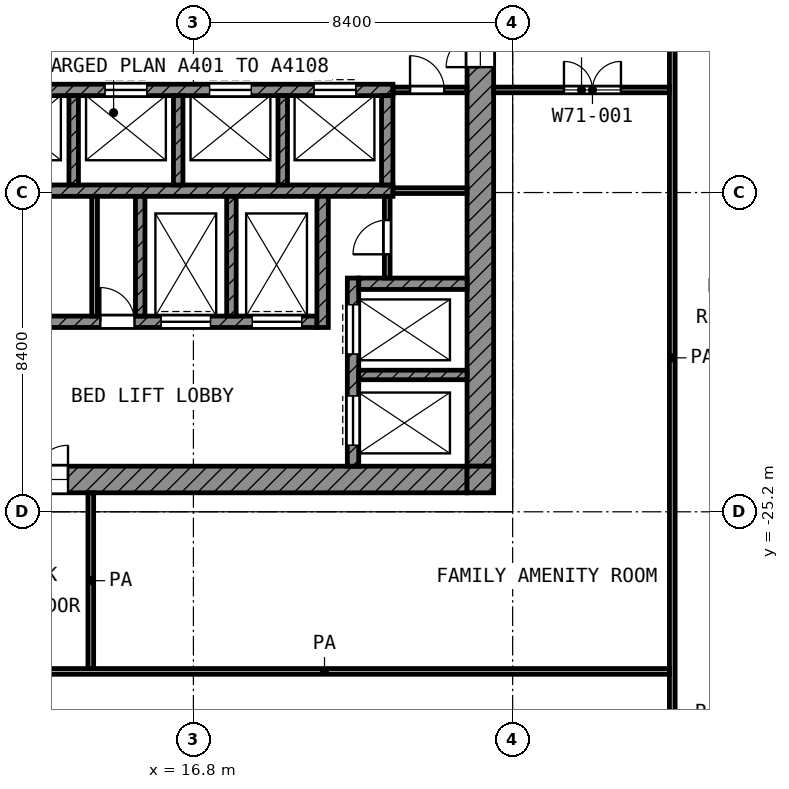
"""IFC4 building model, lengths in metres.
Left out: names, types, materials, properties, quantities, classifications, styles, units other than length and angle.
Written with IfcOpenShell. Run it as: python <this file> out.ifc"""

import sys

from ifc_helpers import new_model, si_unit, direction, frame, frame_2d, origin, place, context, subcontext, project, spatial, rectangle, extrude, element, fill, save


model = new_model("IFC4")
c1 = context("Model", 3, precision=1e-05, world=origin(), true_north=direction((0.0, 1.0)))
c2 = subcontext(c1, "Body", "Model", "MODEL_VIEW")
j1 = project(units=[si_unit("LENGTHUNIT", "METRE"), si_unit("PLANEANGLEUNIT", "RADIAN")], contexts=[c1])
p1 = place(None, origin())
s1 = spatial("IfcSite", under=j1, at=p1, CompositionType="ELEMENT")
p2 = place(p1, origin())
s2 = spatial("IfcBuilding", under=s1, at=p2, CompositionType="ELEMENT")
p3 = place(p2, frame((0.0, 0.0, 328.0)))
s3 = spatial("IfcBuildingStorey", under=s2, at=p3, CompositionType="ELEMENT", Elevation=328.0)
p4 = place(p3, frame((24.35, -24.0, 0.0), z_axis=(0.0, 0.0, 1.0), x_axis=(0.0, 1.0, 0.0)))
e1 = element("IfcWall", 1, at=p4, inside=s3, PredefinedType="SHEAR", context=c2, shape_type="SweptSolid", body=[
    extrude(rectangle(XDim=18.6, YDim=0.7, at=frame_2d((9.3, 0.0))), origin(), (0.0, 0.0, 1.0), 3.78),
])
p5 = place(p4, frame((10.5, 0.0, 0.0)))
e2 = element("IfcOpeningElement", 2, at=p5, cuts=e1, PredefinedType="OPENING", context=c2, shape_type="SweptSolid", body=[
    extrude(rectangle(XDim=1.8, YDim=2.1, at=frame_2d((0.9, 1.05))), frame((0.0, 0.36, 0.0), z_axis=(0.0, -1.0, 0.0), x_axis=(1.0, 0.0, 0.0)), (0.0, 0.0, 1.0), 0.72),
])
p6 = place(p3, frame((5.4, -24.35, 0.0), z_axis=(0.0, 0.0, 1.0), x_axis=(1.0, 0.0, 0.0)))
e3 = element("IfcWall", 3, at=p6, inside=s3, PredefinedType="SHEAR", context=c2, shape_type="SweptSolid", body=[
    extrude(rectangle(XDim=18.6, YDim=0.7, at=frame_2d((9.3, 0.0))), origin(), (0.0, 0.0, 1.0), 3.78),
])
p7 = place(p6, frame((6.3, 0.0, 0.0)))
e4 = element("IfcOpeningElement", 4, at=p7, cuts=e3, PredefinedType="OPENING", context=c2, shape_type="SweptSolid", body=[
    extrude(rectangle(XDim=1.8, YDim=2.1, at=frame_2d((0.9, 1.05))), frame((0.0, 0.36, 0.0), z_axis=(0.0, -1.0, 0.0), x_axis=(1.0, 0.0, 0.0)), (0.0, 0.0, 1.0), 0.72),
])
p8 = place(p3, frame((24.35, -24.7, 0.0), z_axis=(0.0, 0.0, 1.0), x_axis=(0.0, 1.0, 0.0)))
e5 = element("IfcWall", 5, at=p8, inside=s3, PredefinedType="SHEAR", context=c2, shape_type="SweptSolid", body=[
    extrude(rectangle(XDim=0.7, YDim=0.7, at=frame_2d((0.35, 0.0))), origin(), (0.0, 0.0, 1.0), 3.78),
])
p9 = place(p3, frame((5.4, -14.1, 0.0), z_axis=(0.0, 0.0, 1.0), x_axis=(1.0, 0.0, 0.0)))
e6 = element("IfcWall", 6, at=p9, inside=s3, PredefinedType="SHEAR", context=c2, shape_type="SweptSolid", body=[
    extrude(rectangle(XDim=16.65, YDim=0.3, at=frame_2d((8.325, 0.0))), origin(), (0.0, 0.0, 1.0), 3.78),
])
p10 = place(p9, frame((6.325, 0.0, 0.0)))
e7 = element("IfcOpeningElement", 7, at=p10, cuts=e6, PredefinedType="OPENING", context=c2, shape_type="SweptSolid", body=[
    extrude(rectangle(XDim=1.1, YDim=2.1, at=frame_2d((0.55, 1.05))), frame((0.0, 0.16, 0.0), z_axis=(0.0, -1.0, 0.0), x_axis=(1.0, 0.0, 0.0)), (0.0, 0.0, 1.0), 0.32),
])
p11 = place(p9, frame((9.075, 0.0, 0.0)))
e8 = element("IfcOpeningElement", 8, at=p11, cuts=e6, PredefinedType="OPENING", context=c2, shape_type="SweptSolid", body=[
    extrude(rectangle(XDim=1.1, YDim=2.1, at=frame_2d((0.55, 1.05))), frame((0.0, 0.16, 0.0), z_axis=(0.0, -1.0, 0.0), x_axis=(1.0, 0.0, 0.0)), (0.0, 0.0, 1.0), 0.32),
])
p12 = place(p9, frame((11.825, 0.0, 0.0)))
e9 = element("IfcOpeningElement", 9, at=p12, cuts=e6, PredefinedType="OPENING", context=c2, shape_type="SweptSolid", body=[
    extrude(rectangle(XDim=1.1, YDim=2.1, at=frame_2d((0.55, 1.05))), frame((0.0, 0.16, 0.0), z_axis=(0.0, -1.0, 0.0), x_axis=(1.0, 0.0, 0.0)), (0.0, 0.0, 1.0), 0.32),
])
p13 = place(p9, frame((14.575, 0.0, 0.0)))
e10 = element("IfcOpeningElement", 10, at=p13, cuts=e6, PredefinedType="OPENING", context=c2, shape_type="SweptSolid", body=[
    extrude(rectangle(XDim=1.1, YDim=2.1, at=frame_2d((0.55, 1.05))), frame((0.0, 0.16, 0.0), z_axis=(0.0, -1.0, 0.0), x_axis=(1.0, 0.0, 0.0)), (0.0, 0.0, 1.0), 0.32),
])
p14 = place(p9, frame((2.3, 0.0, 0.0)))
e11 = element("IfcOpeningElement", 11, at=p14, cuts=e6, PredefinedType="OPENING", context=c2, shape_type="SweptSolid", body=[
    extrude(rectangle(XDim=0.9, YDim=2.1, at=frame_2d((0.45, 1.05))), frame((0.0, 0.16, 0.0), z_axis=(0.0, -1.0, 0.0), x_axis=(1.0, 0.0, 0.0)), (0.0, 0.0, 1.0), 0.32),
])
p15 = place(p3, frame((5.4, -16.75, 0.0), z_axis=(0.0, 0.0, 1.0), x_axis=(1.0, 0.0, 0.0)))
e12 = element("IfcWall", 12, at=p15, inside=s3, PredefinedType="SHEAR", context=c2, shape_type="SweptSolid", body=[
    extrude(rectangle(XDim=16.65, YDim=0.3, at=frame_2d((8.325, 0.0))), origin(), (0.0, 0.0, 1.0), 3.78),
])
p16 = place(p3, frame((5.4, -20.2, 0.0), z_axis=(0.0, 0.0, 1.0), x_axis=(1.0, 0.0, 0.0)))
e13 = element("IfcWall", 13, at=p16, inside=s3, PredefinedType="SHEAR", context=c2, shape_type="SweptSolid", body=[
    extrude(rectangle(XDim=14.65, YDim=0.3, at=frame_2d((7.325, 0.0))), origin(), (0.0, 0.0, 1.0), 3.78),
])
p17 = place(p16, frame((10.55, 0.0, 0.0)))
e14 = element("IfcOpeningElement", 14, at=p17, cuts=e13, PredefinedType="OPENING", context=c2, shape_type="SweptSolid", body=[
    extrude(rectangle(XDim=1.3, YDim=2.1, at=frame_2d((0.65, 1.05))), frame((0.0, 0.16, 0.0), z_axis=(0.0, -1.0, 0.0), x_axis=(1.0, 0.0, 0.0)), (0.0, 0.0, 1.0), 0.32),
])
p18 = place(p16, frame((12.95, 0.0, 0.0)))
e15 = element("IfcOpeningElement", 15, at=p18, cuts=e13, PredefinedType="OPENING", context=c2, shape_type="SweptSolid", body=[
    extrude(rectangle(XDim=1.3, YDim=2.1, at=frame_2d((0.65, 1.05))), frame((0.0, 0.16, 0.0), z_axis=(0.0, -1.0, 0.0), x_axis=(1.0, 0.0, 0.0)), (0.0, 0.0, 1.0), 0.32),
])
p19 = place(p16, frame((0.55, 0.0, 0.0)))
e16 = element("IfcOpeningElement", 16, at=p19, cuts=e13, PredefinedType="OPENING", context=c2, shape_type="SweptSolid", body=[
    extrude(rectangle(XDim=1.3, YDim=2.1, at=frame_2d((0.65, 1.05))), frame((0.0, 0.16, 0.0), z_axis=(0.0, -1.0, 0.0), x_axis=(1.0, 0.0, 0.0)), (0.0, 0.0, 1.0), 0.32),
])
p20 = place(p16, frame((2.95, 0.0, 0.0)))
e17 = element("IfcOpeningElement", 17, at=p20, cuts=e13, PredefinedType="OPENING", context=c2, shape_type="SweptSolid", body=[
    extrude(rectangle(XDim=1.3, YDim=2.1, at=frame_2d((0.65, 1.05))), frame((0.0, 0.16, 0.0), z_axis=(0.0, -1.0, 0.0), x_axis=(1.0, 0.0, 0.0)), (0.0, 0.0, 1.0), 0.32),
])
p21 = place(p16, frame((6.55, 0.0, 0.0)))
e18 = element("IfcOpeningElement", 18, at=p21, cuts=e13, PredefinedType="OPENING", context=c2, shape_type="SweptSolid", body=[
    extrude(rectangle(XDim=0.9, YDim=2.1, at=frame_2d((0.45, 1.05))), frame((0.0, 0.16, 0.0), z_axis=(0.0, -1.0, 0.0), x_axis=(1.0, 0.0, 0.0)), (0.0, 0.0, 1.0), 0.32),
])
p22 = place(p16, frame((8.95, 0.0, 0.0)))
e19 = element("IfcOpeningElement", 19, at=p22, cuts=e13, PredefinedType="OPENING", context=c2, shape_type="SweptSolid", body=[
    extrude(rectangle(XDim=0.9, YDim=2.1, at=frame_2d((0.45, 1.05))), frame((0.0, 0.16, 0.0), z_axis=(0.0, -1.0, 0.0), x_axis=(1.0, 0.0, 0.0)), (0.0, 0.0, 1.0), 0.32),
])
p23 = place(p3, frame((20.2, -20.35, 0.0), z_axis=(0.0, 0.0, 1.0), x_axis=(0.0, 1.0, 0.0)))
e20 = element("IfcWall", 20, at=p23, inside=s3, PredefinedType="SHEAR", context=c2, shape_type="SweptSolid", body=[
    extrude(rectangle(XDim=3.45, YDim=0.3, at=frame_2d((1.725, 0.0))), origin(), (0.0, 0.0, 1.0), 3.78),
])
p24 = place(p3, frame((21.9, -16.6, 0.0), z_axis=(0.0, 0.0, 1.0), x_axis=(0.0, 1.0, 0.0)))
e21 = element("IfcWall", 21, at=p24, inside=s3, PredefinedType="SHEAR", context=c2, shape_type="SweptSolid", body=[
    extrude(rectangle(XDim=2.35, YDim=0.3, at=frame_2d((1.175, 0.0))), origin(), (0.0, 0.0, 1.0), 3.78),
])
p25 = place(p3, frame((21.15, -19.2, 0.0), z_axis=(0.0, 0.0, 1.0), x_axis=(1.0, 0.0, 0.0)))
e22 = element("IfcWall", 22, at=p25, inside=s3, PredefinedType="SHEAR", context=c2, shape_type="SweptSolid", body=[
    extrude(rectangle(XDim=2.85, YDim=0.3, at=frame_2d((1.425, 0.0))), origin(), (0.0, 0.0, 1.0), 3.78),
])
p26 = place(p3, frame((21.0, -24.0, 0.0), z_axis=(0.0, 0.0, 1.0), x_axis=(0.0, 1.0, 0.0)))
e23 = element("IfcWall", 23, at=p26, inside=s3, PredefinedType="SHEAR", context=c2, shape_type="SweptSolid", body=[
    extrude(rectangle(XDim=4.95, YDim=0.3, at=frame_2d((2.475, 0.0))), origin(), (0.0, 0.0, 1.0), 3.78),
])
p27 = place(p26, frame((2.95, 0.0, 0.0)))
e24 = element("IfcOpeningElement", 24, at=p27, cuts=e23, PredefinedType="OPENING", context=c2, shape_type="SweptSolid", body=[
    extrude(rectangle(XDim=1.3, YDim=2.1, at=frame_2d((0.65, 1.05))), frame((0.0, 0.16, 0.0), z_axis=(0.0, -1.0, 0.0), x_axis=(1.0, 0.0, 0.0)), (0.0, 0.0, 1.0), 0.32),
])
p28 = place(p26, frame((0.55, 0.0, 0.0)))
e25 = element("IfcOpeningElement", 25, at=p28, cuts=e23, PredefinedType="OPENING", context=c2, shape_type="SweptSolid", body=[
    extrude(rectangle(XDim=1.3, YDim=2.1, at=frame_2d((0.65, 1.05))), frame((0.0, 0.16, 0.0), z_axis=(0.0, -1.0, 0.0), x_axis=(1.0, 0.0, 0.0)), (0.0, 0.0, 1.0), 0.32),
])
p29 = place(p3, frame((21.15, -21.6, 0.0), z_axis=(0.0, 0.0, 1.0), x_axis=(1.0, 0.0, 0.0)))
e26 = element("IfcWall", 26, at=p29, inside=s3, PredefinedType="SHEAR", context=c2, shape_type="SweptSolid", body=[
    extrude(rectangle(XDim=2.85, YDim=0.25, at=frame_2d((1.425, 0.0))), origin(), (0.0, 0.0, 1.0), 3.78),
])
for number, where, z_axis, x_axis in (
    (27, (15.4, -20.05, 0.0), (0.0, 0.0, 1.0), (0.0, 1.0, 0.0)),
    (28, (17.8, -20.05, 0.0), (0.0, 0.0, 1.0), (0.0, 1.0, 0.0)),
):
    element("IfcWall", number, at=place(p3, frame(where, z_axis=z_axis, x_axis=x_axis)), inside=s3, PredefinedType="SHEAR", context=c2, shape_type="SweptSolid", body=[
        extrude(rectangle(XDim=3.15, YDim=0.25, at=frame_2d((1.575, 0.0))), origin(), (0.0, 0.0, 1.0), 3.78),
    ])
for number, where, z_axis, x_axis in (
    (29, (13.65, -16.6, 0.0), (0.0, 0.0, 1.0), (0.0, 1.0, 0.0)),
    (30, (16.4, -16.6, 0.0), (0.0, 0.0, 1.0), (0.0, 1.0, 0.0)),
    (31, (19.15, -16.6, 0.0), (0.0, 0.0, 1.0), (0.0, 1.0, 0.0)),
):
    element("IfcWall", number, at=place(p3, frame(where, z_axis=z_axis, x_axis=x_axis)), inside=s3, PredefinedType="SHEAR", context=c2, shape_type="SweptSolid", body=[
        extrude(rectangle(XDim=2.35, YDim=0.25, at=frame_2d((1.175, 0.0))), origin(), (0.0, 0.0, 1.0), 3.78),
    ])
p30 = place(p3, frame((21.9, -19.05, 0.0), z_axis=(0.0, 0.0, 1.0), x_axis=(0.0, 1.0, 0.0)))
e32 = element("IfcWall", 32, at=p30, inside=s3, PredefinedType="PARTITIONING", context=c2, shape_type="SweptSolid", body=[
    extrude(rectangle(XDim=2.15, YDim=0.15, at=frame_2d((1.075, 0.0))), origin(), (0.0, 0.0, 1.0), 3.78),
])
p31 = place(p30, frame((0.625, 0.0, 0.0)))
e33 = element("IfcOpeningElement", 33, at=p31, cuts=e32, PredefinedType="OPENING", context=c2, shape_type="SweptSolid", body=[
    extrude(rectangle(XDim=0.9, YDim=2.1, at=frame_2d((0.45, 1.05))), frame((0.0, 0.085, 0.0), z_axis=(0.0, -1.0, 0.0), x_axis=(1.0, 0.0, 0.0)), (0.0, 0.0, 1.0), 0.17),
])
p32 = place(p3, frame((22.05, -16.75, 0.0), z_axis=(0.0, 0.0, 1.0), x_axis=(1.0, 0.0, 0.0)))
e34 = element("IfcWall", 34, at=p32, inside=s3, PredefinedType="PARTITIONING", context=c2, shape_type="SweptSolid", body=[
    extrude(rectangle(XDim=1.95, YDim=0.15, at=frame_2d((0.975, 0.0))), origin(), (0.0, 0.0, 1.0), 3.78),
])
p33 = place(p3, frame((22.05, -14.1, 0.0), z_axis=(0.0, 0.0, 1.0), x_axis=(1.0, 0.0, 0.0)))
e35 = element("IfcWall", 35, at=p33, inside=s3, PredefinedType="PARTITIONING", context=c2, shape_type="SweptSolid", body=[
    extrude(rectangle(XDim=1.95, YDim=0.15, at=frame_2d((0.975, 0.0))), origin(), (0.0, 0.0, 1.0), 3.78),
])
p34 = place(p33, frame((0.45, 0.0, 0.0)))
e36 = element("IfcOpeningElement", 36, at=p34, cuts=e35, PredefinedType="OPENING", context=c2, shape_type="SweptSolid", body=[
    extrude(rectangle(XDim=0.9, YDim=2.1, at=frame_2d((0.45, 1.05))), frame((0.0, 0.085, 0.0), z_axis=(0.0, -1.0, 0.0), x_axis=(1.0, 0.0, 0.0)), (0.0, 0.0, 1.0), 0.17),
])
p35 = place(p3, frame((14.2, -20.05, 0.0), z_axis=(0.0, 0.0, 1.0), x_axis=(0.0, 1.0, 0.0)))
e37 = element("IfcWall", 37, at=p35, inside=s3, PredefinedType="PARTITIONING", context=c2, shape_type="SweptSolid", body=[
    extrude(rectangle(XDim=3.15, YDim=0.15, at=frame_2d((1.575, 0.0))), origin(), (0.0, 0.0, 1.0), 3.78),
])
p36 = place(p3, frame((11.175, -29.4, 0.0), z_axis=(0.0, 0.0, 1.0), x_axis=(1.0, 0.0, 0.0)))
e38 = element("IfcWall", 38, at=p36, inside=s3, PredefinedType="PARTITIONING", context=c2, shape_type="SweptSolid", body=[
    extrude(rectangle(XDim=18.15, YDim=0.15, at=frame_2d((9.075, 0.0))), origin(), (0.0, 0.0, 1.0), 3.78),
])
p37 = place(p3, frame((24.7, -14.1, 0.0), z_axis=(0.0, 0.0, 1.0), x_axis=(1.0, 0.0, 0.0)))
e39 = element("IfcWall", 39, at=p37, inside=s3, PredefinedType="PARTITIONING", context=c2, shape_type="SweptSolid", body=[
    extrude(rectangle(XDim=4.625, YDim=0.15, at=frame_2d((2.312, 0.0))), origin(), (0.0, 0.0, 1.0), 3.78),
])
p38 = place(p37, frame((1.85, 0.0, 0.0)))
e40 = element("IfcOpeningElement", 40, at=p38, cuts=e39, PredefinedType="OPENING", context=c2, shape_type="SweptSolid", body=[
    extrude(rectangle(XDim=1.5, YDim=2.1, at=frame_2d((0.75, 1.05))), frame((0.0, 0.085, 0.0), z_axis=(0.0, -1.0, 0.0), x_axis=(1.0, 0.0, 0.0)), (0.0, 0.0, 1.0), 0.17),
])
p39 = place(p3, frame((14.1, -29.325, 0.0), z_axis=(0.0, 0.0, 1.0), x_axis=(0.0, 1.0, 0.0)))
e41 = element("IfcWall", 41, at=p39, inside=s3, PredefinedType="PARTITIONING", context=c2, shape_type="SweptSolid", body=[
    extrude(rectangle(XDim=4.625, YDim=0.15, at=frame_2d((2.312, 0.0))), origin(), (0.0, 0.0, 1.0), 3.78),
])
p40 = place(p3, frame((29.4, -31.198, 0.0), z_axis=(0.0, 0.0, 1.0), x_axis=(0.0, 1.0, 0.0)))
e42 = element("IfcWall", 42, at=p40, inside=s3, PredefinedType="PARTITIONING", context=c2, shape_type="SweptSolid", body=[
    extrude(rectangle(XDim=20.098, YDim=0.15, at=frame_2d((10.049, 0.0))), origin(), (0.0, 0.0, 1.0), 3.78),
])
p41 = place(p11, origin())
e43 = element("IfcDoor", 43, at=p41, inside=s3, OperationType="DOUBLE_DOOR_SLIDING", PredefinedType="DOOR", context=c2, shape_type="SweptSolid", body=[
    extrude(rectangle(XDim=1.1, YDim=2.1, at=frame_2d((0.55, 1.05))), frame((0.0, 0.025, 0.0), z_axis=(0.0, -1.0, 0.0), x_axis=(1.0, 0.0, 0.0)), (0.0, 0.0, 1.0), 0.05),
])
fill(e8, e43)
p42 = place(p12, origin())
e44 = element("IfcDoor", 44, at=p42, inside=s3, OperationType="DOUBLE_DOOR_SLIDING", PredefinedType="DOOR", context=c2, shape_type="SweptSolid", body=[
    extrude(rectangle(XDim=1.1, YDim=2.1, at=frame_2d((0.55, 1.05))), frame((0.0, 0.025, 0.0), z_axis=(0.0, -1.0, 0.0), x_axis=(1.0, 0.0, 0.0)), (0.0, 0.0, 1.0), 0.05),
])
fill(e9, e44)
p43 = place(p13, origin())
e45 = element("IfcDoor", 45, at=p43, inside=s3, OperationType="DOUBLE_DOOR_SLIDING", PredefinedType="DOOR", context=c2, shape_type="SweptSolid", body=[
    extrude(rectangle(XDim=1.1, YDim=2.1, at=frame_2d((0.55, 1.05))), frame((0.0, 0.025, 0.0), z_axis=(0.0, -1.0, 0.0), x_axis=(1.0, 0.0, 0.0)), (0.0, 0.0, 1.0), 0.05),
])
fill(e10, e45)
p44 = place(p27, origin())
e46 = element("IfcDoor", 46, at=p44, inside=s3, OperationType="DOUBLE_DOOR_SLIDING", PredefinedType="DOOR", context=c2, shape_type="SweptSolid", body=[
    extrude(rectangle(XDim=1.3, YDim=2.1, at=frame_2d((0.65, 1.05))), frame((0.0, 0.025, 0.0), z_axis=(0.0, -1.0, 0.0), x_axis=(1.0, 0.0, 0.0)), (0.0, 0.0, 1.0), 0.05),
])
fill(e24, e46)
p45 = place(p28, origin())
e47 = element("IfcDoor", 47, at=p45, inside=s3, OperationType="DOUBLE_DOOR_SLIDING", PredefinedType="DOOR", context=c2, shape_type="SweptSolid", body=[
    extrude(rectangle(XDim=1.3, YDim=2.1, at=frame_2d((0.65, 1.05))), frame((0.0, 0.025, 0.0), z_axis=(0.0, -1.0, 0.0), x_axis=(1.0, 0.0, 0.0)), (0.0, 0.0, 1.0), 0.05),
])
fill(e25, e47)
p46 = place(p17, origin())
e48 = element("IfcDoor", 48, at=p46, inside=s3, OperationType="DOUBLE_DOOR_SLIDING", PredefinedType="DOOR", context=c2, shape_type="SweptSolid", body=[
    extrude(rectangle(XDim=1.3, YDim=2.1, at=frame_2d((0.65, 1.05))), frame((0.0, 0.025, 0.0), z_axis=(0.0, -1.0, 0.0), x_axis=(1.0, 0.0, 0.0)), (0.0, 0.0, 1.0), 0.05),
])
fill(e14, e48)
p47 = place(p18, origin())
e49 = element("IfcDoor", 49, at=p47, inside=s3, OperationType="DOUBLE_DOOR_SLIDING", PredefinedType="DOOR", context=c2, shape_type="SweptSolid", body=[
    extrude(rectangle(XDim=1.3, YDim=2.1, at=frame_2d((0.65, 1.05))), frame((0.0, 0.025, 0.0), z_axis=(0.0, -1.0, 0.0), x_axis=(1.0, 0.0, 0.0)), (0.0, 0.0, 1.0), 0.05),
])
fill(e15, e49)
p48 = place(p5, origin())
e50 = element("IfcDoor", 50, at=p48, inside=s3, OperationType="DOUBLE_DOOR_SINGLE_SWING", PredefinedType="DOOR", context=c2, shape_type="SweptSolid", body=[
    extrude(rectangle(XDim=1.8, YDim=2.1, at=frame_2d((0.9, 1.05))), frame((0.0, 0.025, 0.0), z_axis=(0.0, -1.0, 0.0), x_axis=(1.0, 0.0, 0.0)), (0.0, 0.0, 1.0), 0.05),
])
fill(e2, e50)
p49 = place(p7, origin())
e51 = element("IfcDoor", 51, at=p49, inside=s3, OperationType="DOUBLE_DOOR_SINGLE_SWING", PredefinedType="DOOR", context=c2, shape_type="SweptSolid", body=[
    extrude(rectangle(XDim=1.8, YDim=2.1, at=frame_2d((0.9, 1.05))), frame((0.0, 0.025, 0.0), z_axis=(0.0, -1.0, 0.0), x_axis=(1.0, 0.0, 0.0)), (0.0, 0.0, 1.0), 0.05),
])
fill(e4, e51)
p50 = place(p34, origin())
e52 = element("IfcDoor", 52, at=p50, inside=s3, OperationType="SINGLE_SWING_LEFT", PredefinedType="DOOR", context=c2, shape_type="SweptSolid", body=[
    extrude(rectangle(XDim=0.9, YDim=2.1, at=frame_2d((0.45, 1.05))), frame((0.0, 0.025, 0.0), z_axis=(0.0, -1.0, 0.0), x_axis=(1.0, 0.0, 0.0)), (0.0, 0.0, 1.0), 0.05),
])
fill(e36, e52)
p51 = place(p31, origin())
e53 = element("IfcDoor", 53, at=p51, inside=s3, OperationType="SINGLE_SWING_LEFT", PredefinedType="DOOR", context=c2, shape_type="SweptSolid", body=[
    extrude(rectangle(XDim=0.9, YDim=2.1, at=frame_2d((0.45, 1.05))), frame((0.0, 0.025, 0.0), z_axis=(0.0, -1.0, 0.0), x_axis=(1.0, 0.0, 0.0)), (0.0, 0.0, 1.0), 0.05),
])
fill(e33, e53)
p52 = place(p22, origin())
e54 = element("IfcDoor", 54, at=p52, inside=s3, OperationType="SINGLE_SWING_LEFT", PredefinedType="DOOR", context=c2, shape_type="SweptSolid", body=[
    extrude(rectangle(XDim=0.9, YDim=2.1, at=frame_2d((0.45, 1.05))), frame((0.0, 0.025, 0.0), z_axis=(0.0, -1.0, 0.0), x_axis=(1.0, 0.0, 0.0)), (0.0, 0.0, 1.0), 0.05),
])
fill(e19, e54)
p53 = place(p38, origin())
e55 = element("IfcDoor", 55, at=p53, inside=s3, OperationType="DOUBLE_DOOR_SINGLE_SWING", PredefinedType="DOOR", context=c2, shape_type="SweptSolid", body=[
    extrude(rectangle(XDim=1.5, YDim=2.1, at=frame_2d((0.75, 1.05))), frame((0.0, 0.025, 0.0), z_axis=(0.0, -1.0, 0.0), x_axis=(1.0, 0.0, 0.0)), (0.0, 0.0, 1.0), 0.05),
])
fill(e40, e55)
save(model, sys.argv[1])
